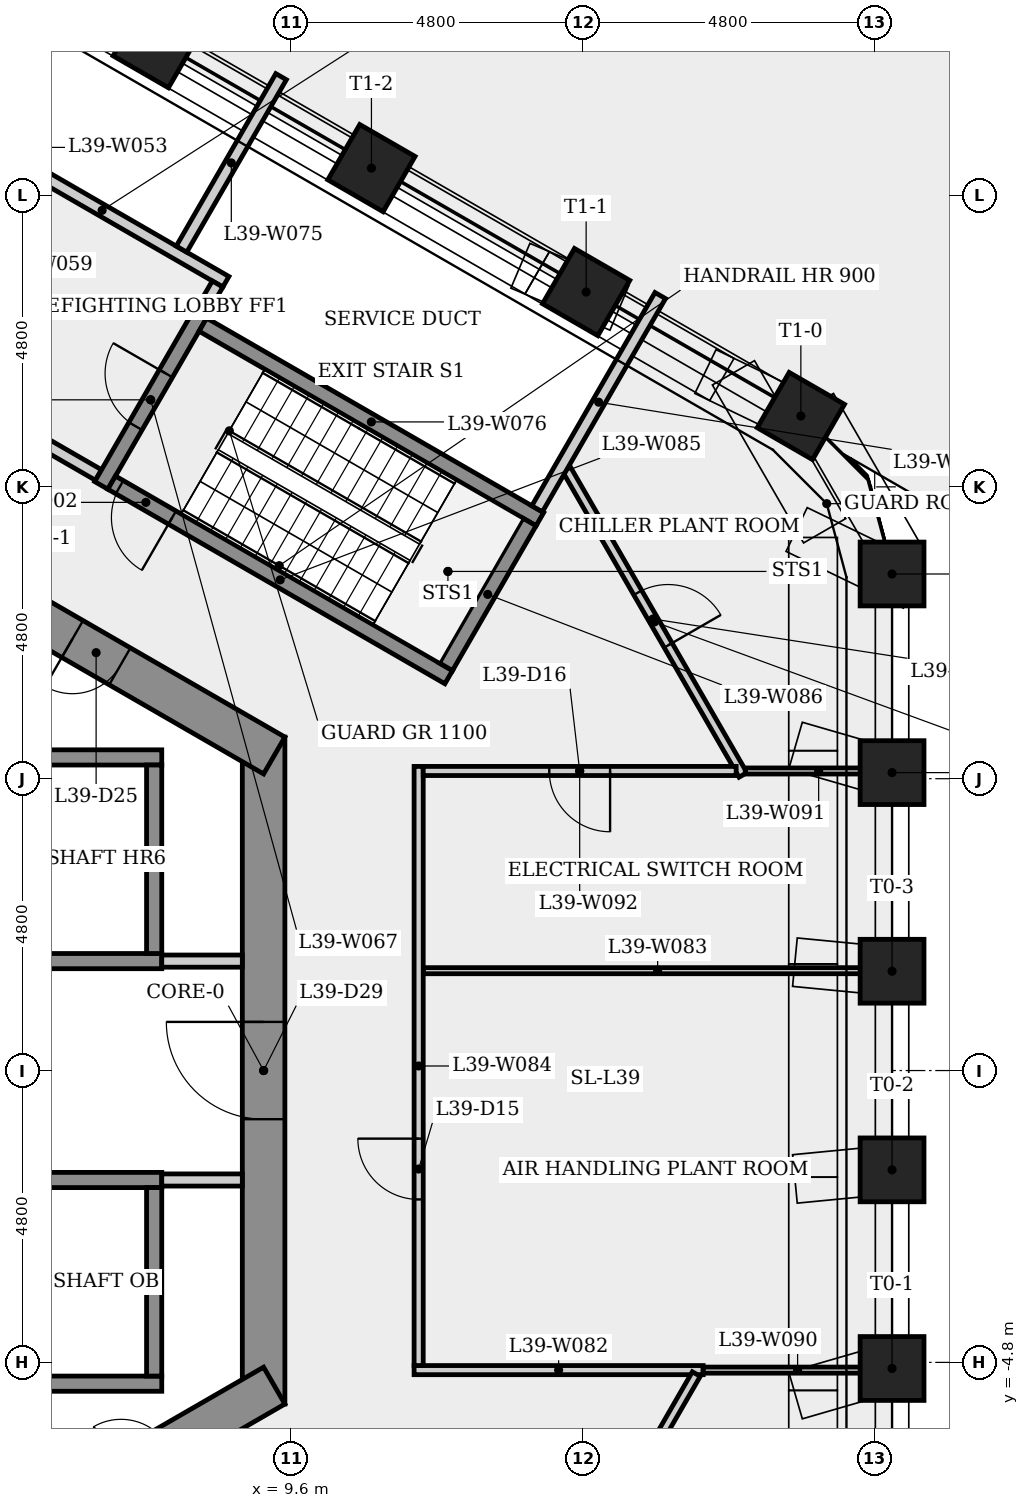
"""IFC4 building model, lengths in metres.
Left out: names, types, materials, properties, quantities, classifications, styles, units other than length and angle.
Written with IfcOpenShell. Run it as: python <this file> out.ifc"""

import sys

from ifc_helpers import new_model, si_unit, direction, frame, frame_2d, origin, origin_2d, place, context, subcontext, project, spatial, rectangle, extrude, element, fill, save


model = new_model("IFC4")
c1 = context("Model", 3, precision=1e-05, world=origin(), true_north=direction((0.0, 1.0)))
c2 = subcontext(c1, "Body", "Model", "MODEL_VIEW")
j1 = project(units=[si_unit("LENGTHUNIT", "METRE"), si_unit("PLANEANGLEUNIT", "RADIAN")], contexts=[c1])
p1 = place(None, origin())
s1 = spatial("IfcSite", under=j1, at=p1, CompositionType="ELEMENT")
p2 = place(p1, origin())
s2 = spatial("IfcBuilding", under=s1, at=p2, CompositionType="ELEMENT")
p3 = place(p2, frame((0.0, 0.0, 147.9)))
s3 = spatial("IfcBuildingStorey", under=s2, at=p3, CompositionType="ELEMENT", Elevation=147.9)
p4 = place(p3, frame((9.15, -5.485, 0.0), z_axis=(0.0, 0.0, 1.0), x_axis=(0.0, 1.0, 0.0)))
e1 = element("IfcWall", 1, at=p4, inside=s3, PredefinedType="SHEAR", context=c2, shape_type="SweptSolid", body=[
    extrude(rectangle(XDim=10.97, YDim=0.7, at=frame_2d((5.485, 0.0))), origin(), (0.0, 0.0, 1.0), 4.8),
])
p5 = place(p4, frame((4.685, 0.0, 0.0)))
e2 = element("IfcOpeningElement", 2, at=p5, cuts=e1, PredefinedType="OPENING", context=c2, shape_type="SweptSolid", body=[
    extrude(rectangle(XDim=1.6, YDim=2.1, at=frame_2d((0.8, 1.05))), frame((0.0, 0.36, 0.0), z_axis=(0.0, -1.0, 0.0), x_axis=(1.0, 0.0, 0.0)), (0.0, 0.0, 1.0), 0.72),
])
p6 = place(p3, frame((9.325, 5.182, 0.0), z_axis=(0.0, 0.0, 1.0), x_axis=(-0.866023993627, 0.500002442456, 0.0)))
e3 = element("IfcWall", 3, at=p6, inside=s3, PredefinedType="SHEAR", context=c2, shape_type="SweptSolid", body=[
    extrude(rectangle(XDim=10.97, YDim=0.7, at=frame_2d((5.485, 0.0))), origin(), (0.0, 0.0, 1.0), 4.8),
])
p7 = place(p6, frame((2.933, 0.0, 0.0)))
e4 = element("IfcOpeningElement", 4, at=p7, cuts=e3, PredefinedType="OPENING", context=c2, shape_type="SweptSolid", body=[
    extrude(rectangle(XDim=0.9, YDim=2.1, at=frame_2d((0.45, 1.05))), frame((0.0, 0.36, 0.0), z_axis=(0.0, -1.0, 0.0), x_axis=(1.0, 0.0, 0.0)), (0.0, 0.0, 1.0), 0.72),
])
p8 = place(p3, frame((-0.175, -10.667, 0.0), z_axis=(0.0, 0.0, 1.0), x_axis=(0.866023993627, 0.500002442456, 0.0)))
e5 = element("IfcWall", 5, at=p8, inside=s3, PredefinedType="SHEAR", context=c2, shape_type="SweptSolid", body=[
    extrude(rectangle(XDim=10.97, YDim=0.7, at=frame_2d((5.485, 0.0))), origin(), (0.0, 0.0, 1.0), 4.8),
])
p9 = place(p8, frame((1.34, 0.0, 0.0)))
e6 = element("IfcOpeningElement", 6, at=p9, cuts=e5, PredefinedType="OPENING", context=c2, shape_type="SweptSolid", body=[
    extrude(rectangle(XDim=0.9, YDim=2.1, at=frame_2d((0.45, 1.05))), frame((0.0, 0.36, 0.0), z_axis=(0.0, -1.0, 0.0), x_axis=(1.0, 0.0, 0.0)), (0.0, 0.0, 1.0), 0.72),
])
p10 = place(p8, frame((8.061, 0.0, 0.0)))
e7 = element("IfcOpeningElement", 7, at=p10, cuts=e5, PredefinedType="OPENING", context=c2, shape_type="SweptSolid", body=[
    extrude(rectangle(XDim=0.9, YDim=2.1, at=frame_2d((0.45, 1.05))), frame((0.0, 0.36, 0.0), z_axis=(0.0, -1.0, 0.0), x_axis=(1.0, 0.0, 0.0)), (0.0, 0.0, 1.0), 0.72),
])
for number, where, z_axis, x_axis in (
    (8, (19.486, -4.9, 0.0), (0.0, 0.0, 1.0), (1.0, 0.0, 0.0)),
    (9, (19.486, -1.633, 0.0), (0.0, 0.0, 1.0), (1.0, 0.0, 0.0)),
    (10, (19.486, 1.633, 0.0), (0.0, 0.0, 1.0), (1.0, 0.0, 0.0)),
    (11, (19.486, 4.9, 0.0), (0.0, 0.0, 1.0), (1.0, 0.0, 0.0)),
    (12, (19.486, 8.167, 0.0), (0.0, 0.0, 1.0), (1.0, 0.0, 0.0)),
    (13, (17.986, 10.765, 0.0), (0.0, 0.0, 1.0), (0.5, 0.866, 0.0)),
    (14, (14.455, 12.804, 0.0), (0.0, 0.0, 1.0), (0.5, 0.866, 0.0)),
    (15, (10.923, 14.843, 0.0), (0.0, 0.0, 1.0), (0.5, 0.866, 0.0)),
    (16, (7.392, 16.881, 0.0), (0.0, 0.0, 1.0), (0.5, 0.866, 0.0)),
):
    element("IfcColumn", number, at=place(p3, frame(where, z_axis=z_axis, x_axis=x_axis)), inside=s3, PredefinedType="COLUMN", context=c2, shape_type="SweptSolid", body=[
        extrude(rectangle(XDim=1.05, YDim=1.05, at=origin_2d()), origin(), (0.0, 0.0, 1.0), 4.45),
    ])
p11 = place(p3, frame((-7.475, 1.8, 0.0), z_axis=(0.0, 0.0, 1.0), x_axis=(1.0, 0.0, 0.0)))
e17 = element("IfcWall", 17, at=p11, inside=s3, PredefinedType="SHEAR", context=c2, shape_type="SweptSolid", body=[
    extrude(rectangle(XDim=14.95, YDim=0.25, at=frame_2d((7.475, 0.0))), origin(), (0.0, 0.0, 1.0), 4.45),
])
for number, where, z_axis, x_axis in (
    (18, (-7.225, 5.15, 0.0), (0.0, 0.0, 1.0), (1.0, 0.0, 0.0)),
    (19, (-7.225, -5.15, 0.0), (0.0, 0.0, 1.0), (1.0, 0.0, 0.0)),
):
    element("IfcWall", number, at=place(p3, frame(where, z_axis=z_axis, x_axis=x_axis)), inside=s3, PredefinedType="SHEAR", context=c2, shape_type="SweptSolid", body=[
        extrude(rectangle(XDim=14.7, YDim=0.25, at=frame_2d((7.35, 0.0))), origin(), (0.0, 0.0, 1.0), 4.45),
    ])
p12 = place(p3, frame((-7.225, -1.8, 0.0), z_axis=(0.0, 0.0, 1.0), x_axis=(1.0, 0.0, 0.0)))
e20 = element("IfcWall", 20, at=p12, inside=s3, PredefinedType="SHEAR", context=c2, shape_type="SweptSolid", body=[
    extrude(rectangle(XDim=14.7, YDim=0.25, at=frame_2d((7.35, 0.0))), origin(), (0.0, 0.0, 1.0), 4.45),
])
p13 = place(p12, frame((10.35, 0.0, 0.0)))
e21 = element("IfcOpeningElement", 21, at=p13, cuts=e20, PredefinedType="OPENING", context=c2, shape_type="SweptSolid", body=[
    extrude(rectangle(XDim=1.1, YDim=2.1, at=frame_2d((0.55, 1.05))), frame((0.0, 0.135, 0.0), z_axis=(0.0, -1.0, 0.0), x_axis=(1.0, 0.0, 0.0)), (0.0, 0.0, 1.0), 0.27),
])
p14 = place(p3, frame((4.459, 15.323, 0.0), z_axis=(0.0, 0.0, 1.0), x_axis=(0.866016039709, -0.500016218704, 0.0)))
e22 = element("IfcWall", 22, at=p14, inside=s3, PredefinedType="PLUMBINGWALL", context=c2, shape_type="SweptSolid", body=[
    extrude(rectangle(XDim=4.7, YDim=0.2, at=frame_2d((2.35, 0.0))), origin(), (0.0, 0.0, 1.0), 4.45),
])
p15 = place(p3, frame((6.435, 9.795, 0.0), z_axis=(0.0, 0.0, 1.0), x_axis=(-0.866012907634, 0.500021643343, 0.0)))
e23 = element("IfcWall", 23, at=p15, inside=s3, PredefinedType="PARTITIONING", context=c2, shape_type="SweptSolid", body=[
    extrude(rectangle(XDim=4.45, YDim=0.2, at=frame_2d((2.225, 0.0))), origin(), (0.0, 0.0, 1.0), 4.45),
])
p16 = place(p15, frame((1.675, 0.0, 0.0)))
e24 = element("IfcOpeningElement", 24, at=p16, cuts=e23, PredefinedType="OPENING", context=c2, shape_type="SweptSolid", body=[
    extrude(rectangle(XDim=1.1, YDim=2.1, at=frame_2d((0.55, 1.05))), frame((0.0, 0.11, 0.0), z_axis=(0.0, -1.0, 0.0), x_axis=(1.0, 0.0, 0.0)), (0.0, 0.0, 1.0), 0.22),
])
p17 = place(p3, frame((6.48, 9.624, 0.0), z_axis=(0.0, 0.0, 1.0), x_axis=(0.500017246033, 0.866015446554, 0.0)))
e25 = element("IfcWall", 25, at=p17, inside=s3, PredefinedType="SHEAR", context=c2, shape_type="SweptSolid", body=[
    extrude(rectangle(XDim=3.25, YDim=0.25, at=frame_2d((1.625, 0.0))), origin(), (0.0, 0.0, 1.0), 4.45),
])
p18 = place(p17, frame((1.125, 0.0, 0.0)))
e26 = element("IfcOpeningElement", 26, at=p18, cuts=e25, PredefinedType="OPENING", context=c2, shape_type="SweptSolid", body=[
    extrude(rectangle(XDim=1.0, YDim=2.1, at=frame_2d((0.5, 1.05))), frame((0.0, 0.135, 0.0), z_axis=(0.0, -1.0, 0.0), x_axis=(1.0, 0.0, 0.0)), (0.0, 0.0, 1.0), 0.27),
])
p19 = place(p3, frame((7.475, 1.8, 0.0), z_axis=(0.0, 0.0, 1.0), x_axis=(1.0, 0.0, 0.0)))
e27 = element("IfcWall", 27, at=p19, inside=s3, PredefinedType="PARTITIONING", context=c2, shape_type="SweptSolid", body=[
    extrude(rectangle(XDim=1.325, YDim=0.2, at=frame_2d((0.663, 0.0))), origin(), (0.0, 0.0, 1.0), 4.45),
])
for number, where, z_axis, x_axis in (
    (28, (7.35, -1.925, 0.0), (0.0, 0.0, 1.0), (0.0, -1.0, 0.0)),
    (29, (7.35, 5.025, 0.0), (0.0, 0.0, 1.0), (0.0, -1.0, 0.0)),
):
    element("IfcWall", number, at=place(p3, frame(where, z_axis=z_axis, x_axis=x_axis)), inside=s3, PredefinedType="SHEAR", context=c2, shape_type="SweptSolid", body=[
        extrude(rectangle(XDim=3.1, YDim=0.25, at=frame_2d((1.55, 0.0))), origin(), (0.0, 0.0, 1.0), 4.8),
    ])
p20 = place(p3, frame((7.8, 13.51, 0.0), z_axis=(0.0, 0.0, 1.0), x_axis=(0.499986987217, 0.866032916588, 0.0)))
e30 = element("IfcWall", 30, at=p20, inside=s3, PredefinedType="PLUMBINGWALL", context=c2, shape_type="SweptSolid", body=[
    extrude(rectangle(XDim=3.275, YDim=0.2, at=frame_2d((1.638, 0.0))), origin(), (0.0, 0.0, 1.0), 4.45),
])
p21 = place(p3, frame((8.151, 12.268, 0.0), z_axis=(0.0, 0.0, 1.0), x_axis=(0.866025499775, -0.499999833739, 0.0)))
e31 = element("IfcWall", 31, at=p21, inside=s3, PredefinedType="SHEAR", context=c2, shape_type="SweptSolid", body=[
    extrude(rectangle(XDim=6.4, YDim=0.25, at=frame_2d((3.2, 0.0))), origin(), (0.0, 0.0, 1.0), 4.45),
])
p22 = place(p3, frame((8.393, 12.937, 0.0), z_axis=(0.0, 0.0, 1.0), x_axis=(-0.500065409566, -0.86598763626, 0.0)))
e32 = element("IfcWall", 32, at=p22, inside=s3, PredefinedType="PLUMBINGWALL", context=c2, shape_type="SweptSolid", body=[
    extrude(rectangle(XDim=0.575, YDim=0.2, at=frame_2d((0.288, 0.0))), origin(), (0.0, 0.0, 1.0), 4.45),
])
p23 = place(p3, frame((8.8, -1.8, 0.0), z_axis=(0.0, 0.0, 1.0), x_axis=(-1.0, 0.0, 0.0)))
e33 = element("IfcWall", 33, at=p23, inside=s3, PredefinedType="PARTITIONING", context=c2, shape_type="SweptSolid", body=[
    extrude(rectangle(XDim=1.325, YDim=0.2, at=frame_2d((0.663, 0.0))), origin(), (0.0, 0.0, 1.0), 4.45),
])
p24 = place(p3, frame((11.625, -4.927, 0.0), z_axis=(0.0, 0.0, 1.0), x_axis=(1.0, 0.0, 0.0)))
e34 = element("IfcWall", 34, at=p24, inside=s3, PredefinedType="PARTITIONING", context=c2, shape_type="SweptSolid", body=[
    extrude(rectangle(XDim=4.754, YDim=0.15, at=frame_2d((2.377, 0.0))), origin(), (0.0, 0.0, 1.0), 4.45),
])
p25 = place(p3, frame((11.775, 1.642, 0.0), z_axis=(0.0, 0.0, 1.0), x_axis=(1.0, 0.0, 0.0)))
e35 = element("IfcWall", 35, at=p25, inside=s3, PredefinedType="PARTITIONING", context=c2, shape_type="SweptSolid", body=[
    extrude(rectangle(XDim=7.711, YDim=0.1, at=frame_2d((3.855, 0.0))), origin(), (0.0, 0.0, 1.0), 2.625),
])
p26 = place(p3, frame((11.7, -4.852, 0.0), z_axis=(0.0, 0.0, 1.0), x_axis=(0.0, 1.0, 0.0)))
e36 = element("IfcWall", 36, at=p26, inside=s3, PredefinedType="PARTITIONING", context=c2, shape_type="SweptSolid", body=[
    extrude(rectangle(XDim=9.854, YDim=0.15, at=frame_2d((4.927, 0.0))), origin(), (0.0, 0.0, 1.0), 4.45),
])
p27 = place(p26, frame((2.732, 0.0, 0.0)))
e37 = element("IfcOpeningElement", 37, at=p27, cuts=e36, PredefinedType="OPENING", context=c2, shape_type="SweptSolid", body=[
    extrude(rectangle(XDim=1.0, YDim=2.1, at=frame_2d((0.5, 1.05))), frame((0.0, 0.085, 0.0), z_axis=(0.0, -1.0, 0.0), x_axis=(1.0, 0.0, 0.0)), (0.0, 0.0, 1.0), 0.17),
])
p28 = place(p3, frame((12.194, 6.47, 0.0), z_axis=(0.0, 0.0, 1.0), x_axis=(-0.866025499775, 0.499999833739, 0.0)))
e38 = element("IfcWall", 38, at=p28, inside=s3, PredefinedType="SHEAR", context=c2, shape_type="SweptSolid", body=[
    extrude(rectangle(XDim=6.4, YDim=0.25, at=frame_2d((3.2, 0.0))), origin(), (0.0, 0.0, 1.0), 4.45),
])
p29 = place(p28, frame((5.25, 0.0, 0.0)))
e39 = element("IfcOpeningElement", 39, at=p29, cuts=e38, PredefinedType="OPENING", context=c2, shape_type="SweptSolid", body=[
    extrude(rectangle(XDim=1.0, YDim=2.1, at=frame_2d((0.5, 1.05))), frame((0.0, 0.135, 0.0), z_axis=(0.0, -1.0, 0.0), x_axis=(1.0, 0.0, 0.0)), (0.0, 0.0, 1.0), 0.27),
])
p30 = place(p3, frame((13.523, 9.022, 0.0), z_axis=(0.0, 0.0, 1.0), x_axis=(-0.500034990121, -0.866005201286, 0.0)))
e40 = element("IfcWall", 40, at=p30, inside=s3, PredefinedType="SHEAR", context=c2, shape_type="SweptSolid", body=[
    extrude(rectangle(XDim=2.75, YDim=0.25, at=frame_2d((1.375, 0.0))), origin(), (0.0, 0.0, 1.0), 4.45),
])
p31 = place(p3, frame((14.127, 9.896, 0.0), z_axis=(0.0, 0.0, 1.0), x_axis=(0.500019366424, -0.866014222285, 0.0)))
e41 = element("IfcWall", 41, at=p31, inside=s3, PredefinedType="PARTITIONING", context=c2, shape_type="SweptSolid", body=[
    extrude(rectangle(XDim=5.813, YDim=0.15, at=frame_2d((2.906, 0.0))), origin(), (0.0, 0.0, 1.0), 4.45),
])
p32 = place(p31, frame((2.352, 0.0, 0.0)))
e42 = element("IfcOpeningElement", 42, at=p32, cuts=e41, PredefinedType="OPENING", context=c2, shape_type="SweptSolid", body=[
    extrude(rectangle(XDim=1.0, YDim=2.1, at=frame_2d((0.5, 1.05))), frame((0.0, 0.085, 0.0), z_axis=(0.0, -1.0, 0.0), x_axis=(1.0, 0.0, 0.0)), (0.0, 0.0, 1.0), 0.17),
])
p33 = place(p3, frame((13.648, 9.239, 0.0), z_axis=(0.0, 0.0, 1.0), x_axis=(0.499983333749, 0.866035025835, 0.0)))
e43 = element("IfcWall", 43, at=p33, inside=s3, PredefinedType="PLUMBINGWALL", context=c2, shape_type="SweptSolid", body=[
    extrude(rectangle(XDim=4.051, YDim=0.2, at=frame_2d((2.025, 0.0))), origin(), (0.0, 0.0, 1.0), 4.45),
])
p34 = place(p3, frame((16.266, -4.992, 0.0), z_axis=(0.0, 0.0, 1.0), x_axis=(-0.499996410164, -0.866027476367, 0.0)))
e44 = element("IfcWall", 44, at=p34, inside=s3, PredefinedType="PARTITIONING", context=c2, shape_type="SweptSolid", body=[
    extrude(rectangle(XDim=8.434, YDim=0.15, at=frame_2d((4.217, 0.0))), origin(), (0.0, 0.0, 1.0), 4.45),
])
p35 = place(p34, frame((3.667, 0.0, 0.0)))
e45 = element("IfcOpeningElement", 45, at=p35, cuts=e44, PredefinedType="OPENING", context=c2, shape_type="SweptSolid", body=[
    extrude(rectangle(XDim=1.1, YDim=2.1, at=frame_2d((0.55, 1.05))), frame((0.0, 0.085, 0.0), z_axis=(0.0, -1.0, 0.0), x_axis=(1.0, 0.0, 0.0)), (0.0, 0.0, 1.0), 0.17),
])
p36 = place(p3, frame((16.379, -4.927, 0.0), z_axis=(0.0, 0.0, 1.0), x_axis=(1.0, 0.0, 0.0)))
e46 = element("IfcWall", 46, at=p36, inside=s3, PredefinedType="PARTITIONING", context=c2, shape_type="SweptSolid", body=[
    extrude(rectangle(XDim=3.107, YDim=0.1, at=frame_2d((1.553, 0.0))), origin(), (0.0, 0.0, 1.0), 4.45),
])
p37 = place(p3, frame((17.071, 4.927, 0.0), z_axis=(0.0, 0.0, 1.0), x_axis=(1.0, 0.0, 0.0)))
e47 = element("IfcWall", 47, at=p37, inside=s3, PredefinedType="PARTITIONING", context=c2, shape_type="SweptSolid", body=[
    extrude(rectangle(XDim=2.414, YDim=0.1, at=frame_2d((1.207, 0.0))), origin(), (0.0, 0.0, 1.0), 4.45),
])
p38 = place(p3, frame((16.921, 4.927, 0.0), z_axis=(0.0, 0.0, 1.0), x_axis=(-1.0, 0.0, 0.0)))
e48 = element("IfcWall", 48, at=p38, inside=s3, PredefinedType="PARTITIONING", context=c2, shape_type="SweptSolid", body=[
    extrude(rectangle(XDim=5.146, YDim=0.15, at=frame_2d((2.573, 0.0))), origin(), (0.0, 0.0, 1.0), 4.45),
])
p39 = place(p38, frame((2.073, 0.0, 0.0)))
e49 = element("IfcOpeningElement", 49, at=p39, cuts=e48, PredefinedType="OPENING", context=c2, shape_type="SweptSolid", body=[
    extrude(rectangle(XDim=1.0, YDim=2.1, at=frame_2d((0.5, 1.05))), frame((0.0, 0.085, 0.0), z_axis=(0.0, -1.0, 0.0), x_axis=(1.0, 0.0, 0.0)), (0.0, 0.0, 1.0), 0.17),
])
p40 = place(p29, origin())
e50 = element("IfcDoor", 50, at=p40, inside=s3, OperationType="SINGLE_SWING_LEFT", PredefinedType="DOOR", context=c2, shape_type="SweptSolid", body=[
    extrude(rectangle(XDim=1.0, YDim=2.1, at=frame_2d((0.5, 1.05))), frame((0.0, 0.025, 0.0), z_axis=(0.0, -1.0, 0.0), x_axis=(1.0, 0.0, 0.0)), (0.0, 0.0, 1.0), 0.05),
])
fill(e39, e50)
p41 = place(p18, origin())
e51 = element("IfcDoor", 51, at=p41, inside=s3, OperationType="SINGLE_SWING_RIGHT", PredefinedType="DOOR", context=c2, shape_type="SweptSolid", body=[
    extrude(rectangle(XDim=1.0, YDim=2.1, at=frame_2d((0.5, 1.05))), frame((0.0, 0.025, 0.0), z_axis=(0.0, -1.0, 0.0), x_axis=(1.0, 0.0, 0.0)), (0.0, 0.0, 1.0), 0.05),
])
fill(e26, e51)
p42 = place(p27, origin())
e52 = element("IfcDoor", 52, at=p42, inside=s3, OperationType="SINGLE_SWING_RIGHT", PredefinedType="DOOR", context=c2, shape_type="SweptSolid", body=[
    extrude(rectangle(XDim=1.0, YDim=2.1, at=frame_2d((0.5, 1.05))), frame((0.0, 0.025, 0.0), z_axis=(0.0, -1.0, 0.0), x_axis=(1.0, 0.0, 0.0)), (0.0, 0.0, 1.0), 0.05),
])
fill(e37, e52)
p43 = place(p39, origin())
e53 = element("IfcDoor", 53, at=p43, inside=s3, OperationType="SINGLE_SWING_LEFT", PredefinedType="DOOR", context=c2, shape_type="SweptSolid", body=[
    extrude(rectangle(XDim=1.0, YDim=2.1, at=frame_2d((0.5, 1.05))), frame((0.0, 0.025, 0.0), z_axis=(0.0, -1.0, 0.0), x_axis=(1.0, 0.0, 0.0)), (0.0, 0.0, 1.0), 0.05),
])
fill(e49, e53)
p44 = place(p32, origin())
e54 = element("IfcDoor", 54, at=p44, inside=s3, OperationType="SINGLE_SWING_RIGHT", PredefinedType="DOOR", context=c2, shape_type="SweptSolid", body=[
    extrude(rectangle(XDim=1.0, YDim=2.1, at=frame_2d((0.5, 1.05))), frame((0.0, 0.025, 0.0), z_axis=(0.0, -1.0, 0.0), x_axis=(1.0, 0.0, 0.0)), (0.0, 0.0, 1.0), 0.05),
])
fill(e42, e54)
p45 = place(p7, origin())
e55 = element("IfcDoor", 55, at=p45, inside=s3, OperationType="SINGLE_SWING_RIGHT", PredefinedType="DOOR", context=c2, shape_type="SweptSolid", body=[
    extrude(rectangle(XDim=0.9, YDim=2.1, at=frame_2d((0.45, 1.05))), frame((0.0, 0.025, 0.0), z_axis=(0.0, -1.0, 0.0), x_axis=(1.0, 0.0, 0.0)), (0.0, 0.0, 1.0), 0.05),
])
fill(e4, e55)
p46 = place(p5, origin())
e56 = element("IfcDoor", 56, at=p46, inside=s3, OperationType="SINGLE_SWING_RIGHT", PredefinedType="DOOR", context=c2, shape_type="SweptSolid", body=[
    extrude(rectangle(XDim=1.6, YDim=2.1, at=frame_2d((0.8, 1.05))), frame((0.0, 0.025, 0.0), z_axis=(0.0, -1.0, 0.0), x_axis=(1.0, 0.0, 0.0)), (0.0, 0.0, 1.0), 0.05),
])
fill(e2, e56)
save(model, sys.argv[1])
